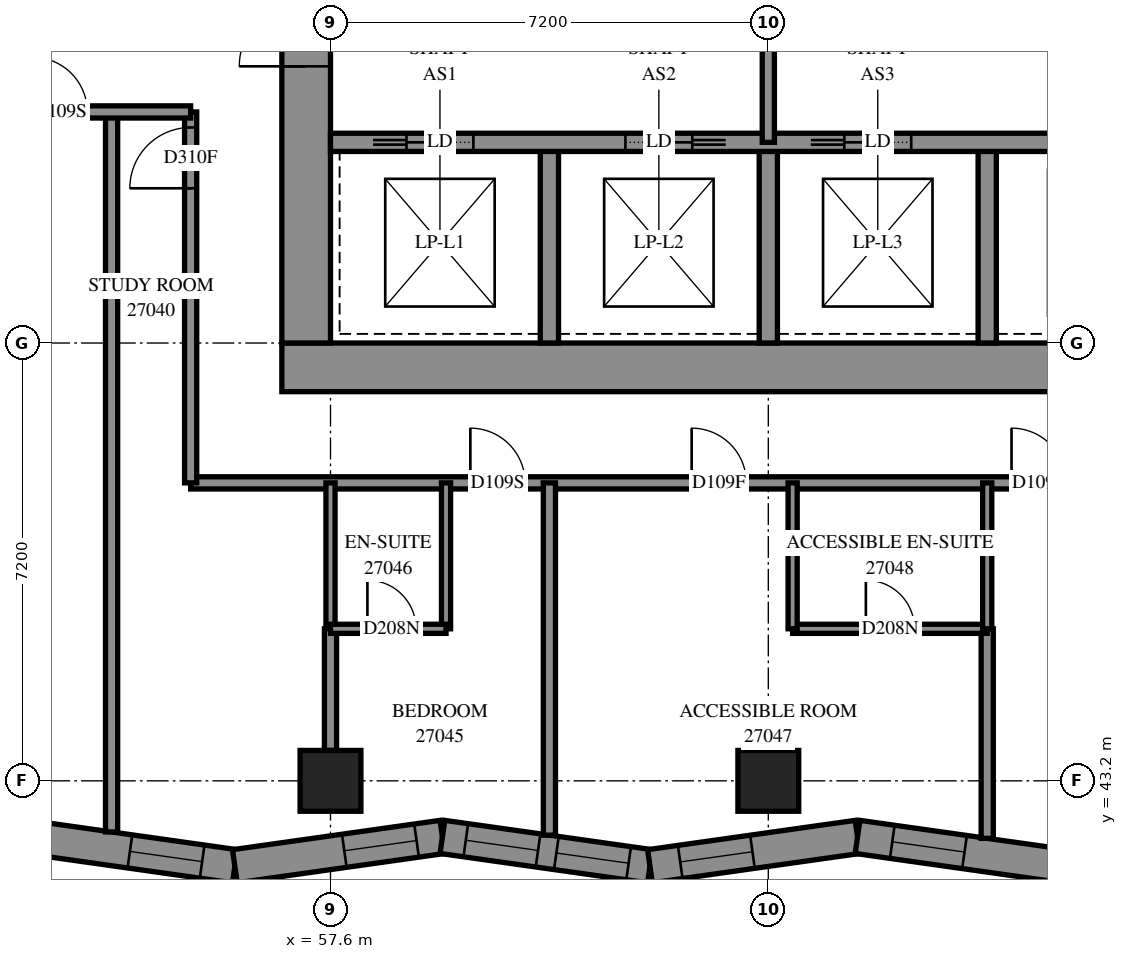
"""IFC4 building model, lengths in metres.
Left out: names, types, materials, properties, quantities, classifications, styles, units other than length and angle.
Written with IfcOpenShell. Run it as: python <this file> out.ifc"""

import sys

from ifc_helpers import new_model, si_unit, direction, frame, frame_2d, origin, origin_2d, place, context, subcontext, project, spatial, polyline, rectangle, outline, extrude, element, fill, save


model = new_model("IFC4")
c1 = context("Model", 3, precision=1e-05, world=origin(), true_north=direction((0.0, 1.0)))
c2 = subcontext(c1, "Body", "Model", "MODEL_VIEW")
j1 = project(units=[si_unit("LENGTHUNIT", "METRE"), si_unit("PLANEANGLEUNIT", "RADIAN")], contexts=[c1])
p1 = place(None, origin())
s1 = spatial("IfcSite", under=j1, at=p1, CompositionType="ELEMENT")
p2 = place(p1, origin())
s2 = spatial("IfcBuilding", under=s1, at=p2, CompositionType="ELEMENT")
p3 = place(p2, frame((0.0, 0.0, 101.6)))
s3 = spatial("IfcBuildingStorey", under=s2, at=p3, CompositionType="ELEMENT", Elevation=101.6)
for number, where, z_axis, x_axis in (
    (1, (57.6, 43.2, 0.0), (0.0, 0.0, 1.0), (1.0, 0.0, 0.0)),
    (2, (64.8, 43.2, 0.0), (0.0, 0.0, 1.0), (1.0, 0.0, 0.0)),
):
    element("IfcColumn", number, at=place(p3, frame(where, z_axis=z_axis, x_axis=x_axis)), inside=s3, PredefinedType="COLUMN", context=c2, shape_type="SweptSolid", body=[
        extrude(rectangle(XDim=1.0, YDim=1.0, at=origin_2d()), origin(), (0.0, 0.0, 1.0), 3.1),
    ])
p4 = place(p3, frame((56.8, 50.0, -0.3), z_axis=(0.0, 0.0, 1.0), x_axis=(1.0, 0.0, 0.0)))
e3 = element("IfcWall", 3, at=p4, inside=s3, PredefinedType="SHEAR", context=c2, shape_type="SweptSolid", body=[
    extrude(rectangle(XDim=16.0, YDim=0.8, at=frame_2d((8.0, 0.0))), origin(), (0.0, 0.0, 1.0), 2.7),
])
p5 = place(p3, frame((57.2, 50.4, -0.3), z_axis=(0.0, 0.0, 1.0), x_axis=(0.0, 1.0, 0.0)))
e4 = element("IfcWall", 4, at=p5, inside=s3, PredefinedType="SHEAR", context=c2, shape_type="SweptSolid", body=[
    extrude(rectangle(XDim=14.4, YDim=0.8, at=frame_2d((7.2, 0.0))), origin(), (0.0, 0.0, 1.0), 2.7),
])
p6 = place(p5, frame((4.55, 0.0, 0.3)))
e5 = element("IfcOpeningElement", 5, at=p6, cuts=e4, PredefinedType="OPENING", context=c2, shape_type="SweptSolid", body=[
    extrude(rectangle(XDim=1.1, YDim=2.1, at=frame_2d((0.55, 1.05))), frame((0.0, 0.41, 0.0), z_axis=(0.0, -1.0, 0.0), x_axis=(1.0, 0.0, 0.0)), (0.0, 0.0, 1.0), 0.82),
])
p7 = place(p5, frame((11.35, 0.0, 0.3)))
e6 = element("IfcOpeningElement", 6, at=p7, cuts=e4, PredefinedType="OPENING", context=c2, shape_type="SweptSolid", body=[
    extrude(rectangle(XDim=1.1, YDim=2.1, at=frame_2d((0.55, 1.05))), frame((0.0, 0.41, 0.0), z_axis=(0.0, -1.0, 0.0), x_axis=(1.0, 0.0, 0.0)), (0.0, 0.0, 1.0), 0.82),
])
for number, where, z_axis, x_axis in (
    (7, (61.2, 50.4, 0.0), (0.0, 0.0, 1.0), (0.0, 1.0, 0.0)),
    (8, (64.8, 50.4, 0.0), (0.0, 0.0, 1.0), (0.0, 1.0, 0.0)),
    (9, (68.4, 50.4, 0.0), (0.0, 0.0, 1.0), (0.0, 1.0, 0.0)),
):
    element("IfcWall", number, at=place(p3, frame(where, z_axis=z_axis, x_axis=x_axis)), inside=s3, PredefinedType="SOLIDWALL", context=c2, shape_type="SweptSolid", body=[
        extrude(rectangle(XDim=3.3, YDim=0.3, at=frame_2d((1.65, 0.0))), origin(), (0.0, 0.0, 1.0), 3.1),
    ])
p8 = place(p3, frame((57.6, 53.7, 0.0), z_axis=(0.0, 0.0, 1.0), x_axis=(1.0, 0.0, 0.0)))
e10 = element("IfcWall", 10, at=p8, inside=s3, PredefinedType="SOLIDWALL", context=c2, shape_type="SweptSolid", body=[
    extrude(rectangle(XDim=14.4, YDim=0.3, at=frame_2d((7.2, 0.0))), origin(), (0.0, 0.0, 1.0), 3.1),
])
p9 = place(p8, frame((1.25, 0.0, 0.0)))
e11 = element("IfcOpeningElement", 11, at=p9, cuts=e10, PredefinedType="OPENING", context=c2, shape_type="SweptSolid", body=[
    extrude(rectangle(XDim=1.1, YDim=2.1, at=frame_2d((0.55, 1.05))), frame((0.0, 0.16, 0.0), z_axis=(0.0, -1.0, 0.0), x_axis=(1.0, 0.0, 0.0)), (0.0, 0.0, 1.0), 0.32),
])
p10 = place(p8, frame((4.85, 0.0, 0.0)))
e12 = element("IfcOpeningElement", 12, at=p10, cuts=e10, PredefinedType="OPENING", context=c2, shape_type="SweptSolid", body=[
    extrude(rectangle(XDim=1.1, YDim=2.1, at=frame_2d((0.55, 1.05))), frame((0.0, 0.16, 0.0), z_axis=(0.0, -1.0, 0.0), x_axis=(1.0, 0.0, 0.0)), (0.0, 0.0, 1.0), 0.32),
])
p11 = place(p8, frame((8.45, 0.0, 0.0)))
e13 = element("IfcOpeningElement", 13, at=p11, cuts=e10, PredefinedType="OPENING", context=c2, shape_type="SweptSolid", body=[
    extrude(rectangle(XDim=1.1, YDim=2.1, at=frame_2d((0.55, 1.05))), frame((0.0, 0.16, 0.0), z_axis=(0.0, -1.0, 0.0), x_axis=(1.0, 0.0, 0.0)), (0.0, 0.0, 1.0), 0.32),
])
p12 = place(p8, frame((12.05, 0.0, 0.0)))
e14 = element("IfcOpeningElement", 14, at=p12, cuts=e10, PredefinedType="OPENING", context=c2, shape_type="SweptSolid", body=[
    extrude(rectangle(XDim=1.1, YDim=2.1, at=frame_2d((0.55, 1.05))), frame((0.0, 0.16, 0.0), z_axis=(0.0, -1.0, 0.0), x_axis=(1.0, 0.0, 0.0)), (0.0, 0.0, 1.0), 0.32),
])
p13 = place(p3, frame((52.59, 42.281, 0.0), z_axis=(0.0, 0.0, 1.0), x_axis=(0.9901775212, -0.1398158663, 0.0)))
e15 = element("IfcWall", 15, at=p13, inside=s3, PredefinedType="SOLIDWALL", context=c2, shape_type="SweptSolid", body=[
    extrude(outline(polyline([(0.062, -0.275), (3.51, -0.275), (3.432, 0.275), (-0.062, 0.275), (0.062, -0.275)])), origin(), (0.0, 0.0, 1.0), 3.1),
])
p14 = place(p13, frame((1.728, 0.0, 0.5)))
e16 = element("IfcOpeningElement", 16, at=p14, cuts=e15, PredefinedType="OPENING", context=c2, shape_type="SweptSolid", body=[
    extrude(rectangle(XDim=1.2, YDim=2.45, at=frame_2d((0.6, 1.225))), frame((0.0, 0.285, 0.0), z_axis=(0.0, -1.0, 0.0), x_axis=(1.0, 0.0, 0.0)), (0.0, 0.0, 1.0), 0.57),
])
p15 = place(p3, frame((56.027, 41.796, 0.0), z_axis=(0.0, 0.0, 1.0), x_axis=(0.9901773547, 0.1398170455, 0.0)))
e17 = element("IfcWall", 17, at=p15, inside=s3, PredefinedType="SOLIDWALL", context=c2, shape_type="SweptSolid", body=[
    extrude(outline(polyline([(-0.039, -0.275), (3.409, -0.275), (3.486, 0.275), (0.039, 0.275), (-0.039, -0.275)])), origin(), (0.0, 0.0, 1.0), 3.1),
])
p16 = place(p15, frame((1.818, 0.0, 0.5)))
e18 = element("IfcOpeningElement", 18, at=p16, cuts=e17, PredefinedType="OPENING", context=c2, shape_type="SweptSolid", body=[
    extrude(rectangle(XDim=1.2, YDim=2.45, at=frame_2d((0.6, 1.225))), frame((0.0, 0.285, 0.0), z_axis=(0.0, -1.0, 0.0), x_axis=(1.0, 0.0, 0.0)), (0.0, 0.0, 1.0), 0.57),
])
p17 = place(p3, frame((59.44, 42.278, 0.0), z_axis=(0.0, 0.0, 1.0), x_axis=(0.9901773547, -0.1398170455, 0.0)))
e19 = element("IfcWall", 19, at=p17, inside=s3, PredefinedType="SOLIDWALL", context=c2, shape_type="SweptSolid", body=[
    extrude(outline(polyline([(0.039, -0.275), (3.486, -0.275), (3.409, 0.275), (-0.039, 0.275), (0.039, -0.275)])), origin(), (0.0, 0.0, 1.0), 3.1),
])
p18 = place(p17, frame((0.389, 0.0, 0.5)))
e20 = element("IfcOpeningElement", 20, at=p18, cuts=e19, PredefinedType="OPENING", context=c2, shape_type="SweptSolid", body=[
    extrude(rectangle(XDim=1.2, YDim=2.45, at=frame_2d((0.6, 1.225))), frame((0.0, 0.285, 0.0), z_axis=(0.0, -1.0, 0.0), x_axis=(1.0, 0.0, 0.0)), (0.0, 0.0, 1.0), 0.57),
])
p19 = place(p17, frame((1.893, 0.0, 0.5)))
e21 = element("IfcOpeningElement", 21, at=p19, cuts=e19, PredefinedType="OPENING", context=c2, shape_type="SweptSolid", body=[
    extrude(rectangle(XDim=1.2, YDim=2.45, at=frame_2d((0.6, 1.225))), frame((0.0, 0.285, 0.0), z_axis=(0.0, -1.0, 0.0), x_axis=(1.0, 0.0, 0.0)), (0.0, 0.0, 1.0), 0.57),
])
p20 = place(p3, frame((62.854, 41.796, 0.0), z_axis=(0.0, 0.0, 1.0), x_axis=(0.9901767876, 0.1398210616, 0.0)))
e22 = element("IfcWall", 22, at=p20, inside=s3, PredefinedType="SOLIDWALL", context=c2, shape_type="SweptSolid", body=[
    extrude(outline(polyline([(-0.039, -0.275), (3.409, -0.275), (3.486, 0.275), (0.039, 0.275), (-0.039, -0.275)])), origin(), (0.0, 0.0, 1.0), 3.1),
])
p21 = place(p20, frame((0.502, 0.0, 0.5)))
e23 = element("IfcOpeningElement", 23, at=p21, cuts=e22, PredefinedType="OPENING", context=c2, shape_type="SweptSolid", body=[
    extrude(rectangle(XDim=1.2, YDim=2.45, at=frame_2d((0.6, 1.225))), frame((0.0, 0.285, 0.0), z_axis=(0.0, -1.0, 0.0), x_axis=(1.0, 0.0, 0.0)), (0.0, 0.0, 1.0), 0.57),
])
p22 = place(p3, frame((66.267, 42.278, 0.0), z_axis=(0.0, 0.0, 1.0), x_axis=(0.9901773547, -0.1398170455, 0.0)))
e24 = element("IfcWall", 24, at=p22, inside=s3, PredefinedType="SOLIDWALL", context=c2, shape_type="SweptSolid", body=[
    extrude(outline(polyline([(0.039, -0.275), (3.486, -0.275), (3.409, 0.275), (-0.039, 0.275), (0.039, -0.275)])), origin(), (0.0, 0.0, 1.0), 3.1),
])
p23 = place(p22, frame((0.577, 0.0, 0.5)))
e25 = element("IfcOpeningElement", 25, at=p23, cuts=e24, PredefinedType="OPENING", context=c2, shape_type="SweptSolid", body=[
    extrude(rectangle(XDim=1.2, YDim=2.45, at=frame_2d((0.6, 1.225))), frame((0.0, 0.285, 0.0), z_axis=(0.0, -1.0, 0.0), x_axis=(1.0, 0.0, 0.0)), (0.0, 0.0, 1.0), 0.57),
])
p24 = place(p3, frame((64.8, 53.7, 0.0), z_axis=(0.0, 0.0, 1.0), x_axis=(0.0, 1.0, 0.0)))
e26 = element("IfcWall", 26, at=p24, inside=s3, PredefinedType="PARTITIONING", context=c2, shape_type="SweptSolid", body=[
    extrude(rectangle(XDim=3.6, YDim=0.2, at=frame_2d((1.8, 0.0))), origin(), (0.0, 0.0, 1.0), 3.1),
])
p25 = place(p3, frame((55.3, 48.1, 0.0), z_axis=(0.0, 0.0, 1.0), x_axis=(1.0, 0.0, 0.0)))
e27 = element("IfcWall", 27, at=p25, inside=s3, PredefinedType="PARTITIONING", context=c2, shape_type="SweptSolid", body=[
    extrude(rectangle(XDim=19.092, YDim=0.2, at=frame_2d((9.546, 0.0))), origin(), (0.0, 0.0, 1.0), 3.1),
])
p26 = place(p25, frame((4.6, 0.0, 0.0)))
e28 = element("IfcOpeningElement", 28, at=p26, cuts=e27, PredefinedType="OPENING", context=c2, shape_type="SweptSolid", body=[
    extrude(rectangle(XDim=0.9, YDim=2.1, at=frame_2d((0.45, 1.05))), frame((0.0, 0.11, 0.0), z_axis=(0.0, -1.0, 0.0), x_axis=(1.0, 0.0, 0.0)), (0.0, 0.0, 1.0), 0.22),
])
p27 = place(p25, frame((8.239, 0.0, 0.0)))
e29 = element("IfcOpeningElement", 29, at=p27, cuts=e27, PredefinedType="OPENING", context=c2, shape_type="SweptSolid", body=[
    extrude(rectangle(XDim=0.9, YDim=2.1, at=frame_2d((0.45, 1.05))), frame((0.0, 0.11, 0.0), z_axis=(0.0, -1.0, 0.0), x_axis=(1.0, 0.0, 0.0)), (0.0, 0.0, 1.0), 0.22),
])
p28 = place(p25, frame((13.5, 0.0, 0.0)))
e30 = element("IfcOpeningElement", 30, at=p28, cuts=e27, PredefinedType="OPENING", context=c2, shape_type="SweptSolid", body=[
    extrude(rectangle(XDim=0.9, YDim=2.1, at=frame_2d((0.45, 1.05))), frame((0.0, 0.11, 0.0), z_axis=(0.0, -1.0, 0.0), x_axis=(1.0, 0.0, 0.0)), (0.0, 0.0, 1.0), 0.22),
])
p29 = place(p3, frame((54.0, 42.36, 0.0), z_axis=(0.0, 0.0, 1.0), x_axis=(0.0, 1.0, 0.0)))
e31 = element("IfcWall", 31, at=p29, inside=s3, PredefinedType="PARTITIONING", context=c2, shape_type="SweptSolid", body=[
    extrude(rectangle(XDim=11.84, YDim=0.2, at=frame_2d((5.92, 0.0))), origin(), (0.0, 0.0, 1.0), 3.1),
])
p30 = place(p3, frame((55.3, 48.1, 0.0), z_axis=(0.0, 0.0, 1.0), x_axis=(0.0, 1.0, 0.0)))
e32 = element("IfcWall", 32, at=p30, inside=s3, PredefinedType="PARTITIONING", context=c2, shape_type="SweptSolid", body=[
    extrude(rectangle(XDim=6.1, YDim=0.2, at=frame_2d((3.05, 0.0))), origin(), (0.0, 0.0, 1.0), 3.1),
])
p31 = place(p30, frame((4.845, 0.0, 0.0)))
e33 = element("IfcOpeningElement", 33, at=p31, cuts=e32, PredefinedType="OPENING", context=c2, shape_type="SweptSolid", body=[
    extrude(rectangle(XDim=1.0, YDim=2.1, at=frame_2d((0.5, 1.05))), frame((0.0, 0.11, 0.0), z_axis=(0.0, -1.0, 0.0), x_axis=(1.0, 0.0, 0.0)), (0.0, 0.0, 1.0), 0.22),
])
p32 = place(p3, frame((61.2, 42.307, 0.0), z_axis=(0.0, 0.0, 1.0), x_axis=(0.0, 1.0, 0.0)))
e34 = element("IfcWall", 34, at=p32, inside=s3, PredefinedType="PARTITIONING", context=c2, shape_type="SweptSolid", body=[
    extrude(rectangle(XDim=5.793, YDim=0.2, at=frame_2d((2.897, 0.0))), origin(), (0.0, 0.0, 1.0), 3.1),
])
p33 = place(p3, frame((50.4, 54.2, 0.0), z_axis=(0.0, 0.0, 1.0), x_axis=(1.0, 0.0, 0.0)))
e35 = element("IfcWall", 35, at=p33, inside=s3, PredefinedType="PARTITIONING", context=c2, shape_type="SweptSolid", body=[
    extrude(rectangle(XDim=4.9, YDim=0.2, at=frame_2d((2.45, 0.0))), origin(), (0.0, 0.0, 1.0), 3.1),
])
p34 = place(p33, frame((2.3, 0.0, 0.0)))
e36 = element("IfcOpeningElement", 36, at=p34, cuts=e35, PredefinedType="OPENING", context=c2, shape_type="SweptSolid", body=[
    extrude(rectangle(XDim=0.9, YDim=2.1, at=frame_2d((0.45, 1.05))), frame((0.0, 0.11, 0.0), z_axis=(0.0, -1.0, 0.0), x_axis=(1.0, 0.0, 0.0)), (0.0, 0.0, 1.0), 0.22),
])
p35 = place(p3, frame((68.4, 42.254, 0.0), z_axis=(0.0, 0.0, 1.0), x_axis=(0.0, 1.0, 0.0)))
e37 = element("IfcWall", 37, at=p35, inside=s3, PredefinedType="PARTITIONING", context=c2, shape_type="SweptSolid", body=[
    extrude(rectangle(XDim=3.446, YDim=0.2, at=frame_2d((1.723, 0.0))), origin(), (0.0, 0.0, 1.0), 3.1),
])
p36 = place(p3, frame((65.2, 45.7, 0.0), z_axis=(0.0, 0.0, 1.0), x_axis=(1.0, 0.0, 0.0)))
e38 = element("IfcWall", 38, at=p36, inside=s3, PredefinedType="PARTITIONING", context=c2, shape_type="SweptSolid", body=[
    extrude(rectangle(XDim=3.2, YDim=0.15, at=frame_2d((1.6, 0.0))), origin(), (0.0, 0.0, 1.0), 3.1),
])
p37 = place(p36, frame((1.204, 0.0, 0.0)))
e39 = element("IfcOpeningElement", 39, at=p37, cuts=e38, PredefinedType="OPENING", context=c2, shape_type="SweptSolid", body=[
    extrude(rectangle(XDim=0.8, YDim=2.1, at=frame_2d((0.4, 1.05))), frame((0.0, 0.085, 0.0), z_axis=(0.0, -1.0, 0.0), x_axis=(1.0, 0.0, 0.0)), (0.0, 0.0, 1.0), 0.17),
])
for number, where, z_axis, x_axis in (
    (40, (59.5, 45.7, 0.0), (0.0, 0.0, 1.0), (0.0, 1.0, 0.0)),
    (41, (57.6, 45.7, 0.0), (0.0, 0.0, 1.0), (0.0, 1.0, 0.0)),
    (42, (65.2, 45.7, 0.0), (0.0, 0.0, 1.0), (0.0, 1.0, 0.0)),
    (43, (68.4, 45.7, 0.0), (0.0, 0.0, 1.0), (0.0, 1.0, 0.0)),
):
    element("IfcWall", number, at=place(p3, frame(where, z_axis=z_axis, x_axis=x_axis)), inside=s3, PredefinedType="PARTITIONING", context=c2, shape_type="SweptSolid", body=[
        extrude(rectangle(XDim=2.4, YDim=0.15, at=frame_2d((1.2, 0.0))), origin(), (0.0, 0.0, 1.0), 3.1),
    ])
p38 = place(p3, frame((57.6, 43.7, 0.0), z_axis=(0.0, 0.0, 1.0), x_axis=(0.0, 1.0, 0.0)))
e44 = element("IfcWall", 44, at=p38, inside=s3, PredefinedType="PARTITIONING", context=c2, shape_type="SweptSolid", body=[
    extrude(rectangle(XDim=2.0, YDim=0.2, at=frame_2d((1.0, 0.0))), origin(), (0.0, 0.0, 1.0), 3.1),
])
p39 = place(p3, frame((57.6, 45.7, 0.0), z_axis=(0.0, 0.0, 1.0), x_axis=(1.0, 0.0, 0.0)))
e45 = element("IfcWall", 45, at=p39, inside=s3, PredefinedType="PARTITIONING", context=c2, shape_type="SweptSolid", body=[
    extrude(rectangle(XDim=1.9, YDim=0.15, at=frame_2d((0.95, 0.0))), origin(), (0.0, 0.0, 1.0), 3.1),
])
p40 = place(p39, frame((0.607, 0.0, 0.0)))
e46 = element("IfcOpeningElement", 46, at=p40, cuts=e45, PredefinedType="OPENING", context=c2, shape_type="SweptSolid", body=[
    extrude(rectangle(XDim=0.8, YDim=2.1, at=frame_2d((0.4, 1.05))), frame((0.0, 0.085, 0.0), z_axis=(0.0, -1.0, 0.0), x_axis=(1.0, 0.0, 0.0)), (0.0, 0.0, 1.0), 0.17),
])
p41 = place(p14, origin())
e47 = element("IfcWindow", 47, at=p41, inside=s3, PartitioningType="SINGLE_PANEL", PredefinedType="WINDOW", context=c2, shape_type="SweptSolid", body=[
    extrude(rectangle(XDim=1.2, YDim=2.45, at=frame_2d((0.6, 1.225))), frame((0.0, 0.155, 0.0), z_axis=(0.0, -1.0, 0.0), x_axis=(1.0, 0.0, 0.0)), (0.0, 0.0, 1.0), 0.06),
])
fill(e16, e47)
p42 = place(p16, origin())
e48 = element("IfcWindow", 48, at=p42, inside=s3, PartitioningType="SINGLE_PANEL", PredefinedType="WINDOW", context=c2, shape_type="SweptSolid", body=[
    extrude(rectangle(XDim=1.2, YDim=2.45, at=frame_2d((0.6, 1.225))), frame((0.0, 0.155, 0.0), z_axis=(0.0, -1.0, 0.0), x_axis=(1.0, 0.0, 0.0)), (0.0, 0.0, 1.0), 0.06),
])
fill(e18, e48)
p43 = place(p18, origin())
e49 = element("IfcWindow", 49, at=p43, inside=s3, PartitioningType="SINGLE_PANEL", PredefinedType="WINDOW", context=c2, shape_type="SweptSolid", body=[
    extrude(rectangle(XDim=1.2, YDim=2.45, at=frame_2d((0.6, 1.225))), frame((0.0, 0.155, 0.0), z_axis=(0.0, -1.0, 0.0), x_axis=(1.0, 0.0, 0.0)), (0.0, 0.0, 1.0), 0.06),
])
fill(e20, e49)
p44 = place(p19, origin())
e50 = element("IfcWindow", 50, at=p44, inside=s3, PartitioningType="SINGLE_PANEL", PredefinedType="WINDOW", context=c2, shape_type="SweptSolid", body=[
    extrude(rectangle(XDim=1.2, YDim=2.45, at=frame_2d((0.6, 1.225))), frame((0.0, 0.155, 0.0), z_axis=(0.0, -1.0, 0.0), x_axis=(1.0, 0.0, 0.0)), (0.0, 0.0, 1.0), 0.06),
])
fill(e21, e50)
p45 = place(p21, origin())
e51 = element("IfcWindow", 51, at=p45, inside=s3, PartitioningType="SINGLE_PANEL", PredefinedType="WINDOW", context=c2, shape_type="SweptSolid", body=[
    extrude(rectangle(XDim=1.2, YDim=2.45, at=frame_2d((0.6, 1.225))), frame((0.0, 0.155, 0.0), z_axis=(0.0, -1.0, 0.0), x_axis=(1.0, 0.0, 0.0)), (0.0, 0.0, 1.0), 0.06),
])
fill(e23, e51)
p46 = place(p23, origin())
e52 = element("IfcWindow", 52, at=p46, inside=s3, PartitioningType="SINGLE_PANEL", PredefinedType="WINDOW", context=c2, shape_type="SweptSolid", body=[
    extrude(rectangle(XDim=1.2, YDim=2.45, at=frame_2d((0.6, 1.225))), frame((0.0, 0.155, 0.0), z_axis=(0.0, -1.0, 0.0), x_axis=(1.0, 0.0, 0.0)), (0.0, 0.0, 1.0), 0.06),
])
fill(e25, e52)
p47 = place(p6, origin())
e53 = element("IfcDoor", 53, at=p47, inside=s3, OperationType="DOUBLE_DOOR_SINGLE_SWING", PredefinedType="DOOR", context=c2, shape_type="SweptSolid", body=[
    extrude(rectangle(XDim=1.1, YDim=2.1, at=frame_2d((0.55, 1.05))), frame((0.0, 0.025, 0.0), z_axis=(0.0, -1.0, 0.0), x_axis=(1.0, 0.0, 0.0)), (0.0, 0.0, 1.0), 0.05),
])
fill(e5, e53)
p48 = place(p9, origin())
e54 = element("IfcDoor", 54, at=p48, inside=s3, OperationType="SLIDING_TO_LEFT", PredefinedType="DOOR", context=c2, shape_type="SweptSolid", body=[
    extrude(rectangle(XDim=1.1, YDim=2.1, at=frame_2d((0.55, 1.05))), frame((0.0, 0.025, 0.0), z_axis=(0.0, -1.0, 0.0), x_axis=(1.0, 0.0, 0.0)), (0.0, 0.0, 1.0), 0.05),
])
fill(e11, e54)
p49 = place(p10, origin())
e55 = element("IfcDoor", 55, at=p49, inside=s3, OperationType="SLIDING_TO_RIGHT", PredefinedType="DOOR", context=c2, shape_type="SweptSolid", body=[
    extrude(rectangle(XDim=1.1, YDim=2.1, at=frame_2d((0.55, 1.05))), frame((0.0, 0.025, 0.0), z_axis=(0.0, -1.0, 0.0), x_axis=(1.0, 0.0, 0.0)), (0.0, 0.0, 1.0), 0.05),
])
fill(e12, e55)
p50 = place(p11, origin())
e56 = element("IfcDoor", 56, at=p50, inside=s3, OperationType="SLIDING_TO_LEFT", PredefinedType="DOOR", context=c2, shape_type="SweptSolid", body=[
    extrude(rectangle(XDim=1.1, YDim=2.1, at=frame_2d((0.55, 1.05))), frame((0.0, 0.025, 0.0), z_axis=(0.0, -1.0, 0.0), x_axis=(1.0, 0.0, 0.0)), (0.0, 0.0, 1.0), 0.05),
])
fill(e13, e56)
p51 = place(p34, origin())
e57 = element("IfcDoor", 57, at=p51, inside=s3, OperationType="SINGLE_SWING_LEFT", PredefinedType="DOOR", context=c2, shape_type="SweptSolid", body=[
    extrude(rectangle(XDim=0.9, YDim=2.1, at=frame_2d((0.45, 1.05))), frame((0.0, 0.025, 0.0), z_axis=(0.0, -1.0, 0.0), x_axis=(1.0, 0.0, 0.0)), (0.0, 0.0, 1.0), 0.05),
])
fill(e36, e57)
p52 = place(p31, origin())
e58 = element("IfcDoor", 58, at=p52, inside=s3, OperationType="SINGLE_SWING_RIGHT", PredefinedType="DOOR", context=c2, shape_type="SweptSolid", body=[
    extrude(rectangle(XDim=1.0, YDim=2.1, at=frame_2d((0.5, 1.05))), frame((0.0, 0.025, 0.0), z_axis=(0.0, -1.0, 0.0), x_axis=(1.0, 0.0, 0.0)), (0.0, 0.0, 1.0), 0.05),
])
fill(e33, e58)
p53 = place(p26, origin())
e59 = element("IfcDoor", 59, at=p53, inside=s3, OperationType="SINGLE_SWING_LEFT", PredefinedType="DOOR", context=c2, shape_type="SweptSolid", body=[
    extrude(rectangle(XDim=0.9, YDim=2.1, at=frame_2d((0.45, 1.05))), frame((0.0, 0.025, 0.0), z_axis=(0.0, -1.0, 0.0), x_axis=(1.0, 0.0, 0.0)), (0.0, 0.0, 1.0), 0.05),
])
fill(e28, e59)
p54 = place(p40, origin())
e60 = element("IfcDoor", 60, at=p54, inside=s3, OperationType="SINGLE_SWING_RIGHT", PredefinedType="DOOR", context=c2, shape_type="SweptSolid", body=[
    extrude(rectangle(XDim=0.8, YDim=2.1, at=frame_2d((0.4, 1.05))), frame((0.0, 0.025, 0.0), z_axis=(0.0, -1.0, 0.0), x_axis=(1.0, 0.0, 0.0)), (0.0, 0.0, 1.0), 0.05),
])
fill(e46, e60)
p55 = place(p27, origin())
e61 = element("IfcDoor", 61, at=p55, inside=s3, OperationType="SINGLE_SWING_RIGHT", PredefinedType="DOOR", context=c2, shape_type="SweptSolid", body=[
    extrude(rectangle(XDim=0.9, YDim=2.1, at=frame_2d((0.45, 1.05))), frame((0.0, 0.025, 0.0), z_axis=(0.0, -1.0, 0.0), x_axis=(1.0, 0.0, 0.0)), (0.0, 0.0, 1.0), 0.05),
])
fill(e29, e61)
p56 = place(p37, origin())
e62 = element("IfcDoor", 62, at=p56, inside=s3, OperationType="SINGLE_SWING_RIGHT", PredefinedType="DOOR", context=c2, shape_type="SweptSolid", body=[
    extrude(rectangle(XDim=0.8, YDim=2.1, at=frame_2d((0.4, 1.05))), frame((0.0, 0.025, 0.0), z_axis=(0.0, -1.0, 0.0), x_axis=(1.0, 0.0, 0.0)), (0.0, 0.0, 1.0), 0.05),
])
fill(e39, e62)
p57 = place(p28, origin())
e63 = element("IfcDoor", 63, at=p57, inside=s3, OperationType="SINGLE_SWING_RIGHT", PredefinedType="DOOR", context=c2, shape_type="SweptSolid", body=[
    extrude(rectangle(XDim=0.9, YDim=2.1, at=frame_2d((0.45, 1.05))), frame((0.0, 0.025, 0.0), z_axis=(0.0, -1.0, 0.0), x_axis=(1.0, 0.0, 0.0)), (0.0, 0.0, 1.0), 0.05),
])
fill(e30, e63)
save(model, sys.argv[1])
